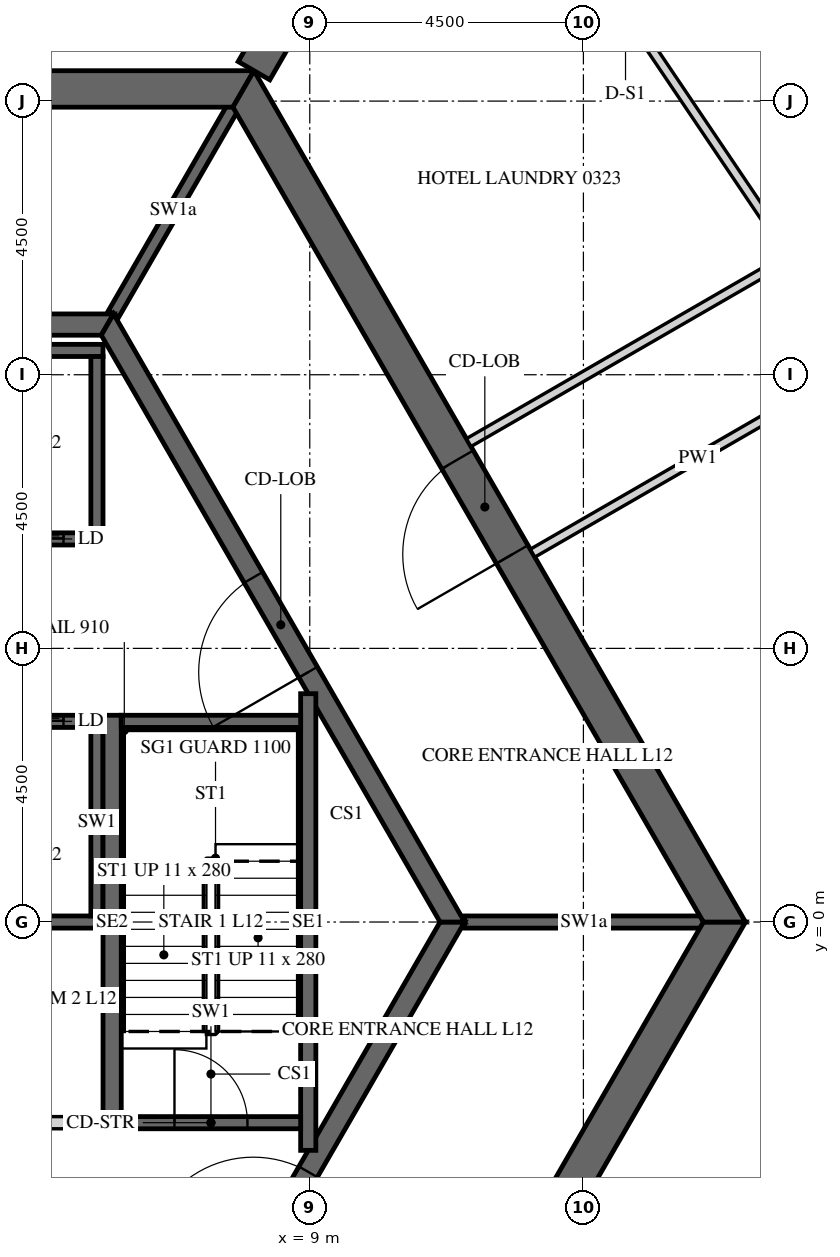
"""IFC4 building model, lengths in metres.
Left out: names, types, materials, properties, quantities, classifications, styles, units other than length and angle.
Written with IfcOpenShell. Run it as: python <this file> out.ifc"""

import sys

from ifc_helpers import new_model, si_unit, direction, frame, frame_2d, origin, place, context, subcontext, project, spatial, polyline, rectangle, outline, extrude, element, fill, save


model = new_model("IFC4")
c1 = context("Model", 3, precision=1e-05, world=origin(), true_north=direction((0.0, 1.0)))
c2 = subcontext(c1, "Body", "Model", "MODEL_VIEW")
j1 = project(units=[si_unit("LENGTHUNIT", "METRE"), si_unit("PLANEANGLEUNIT", "RADIAN")], contexts=[c1])
p1 = place(None, origin())
s1 = spatial("IfcSite", under=j1, at=p1, CompositionType="ELEMENT")
p2 = place(p1, origin())
s2 = spatial("IfcBuilding", under=s1, at=p2, CompositionType="ELEMENT")
p3 = place(p2, frame((0.0, 0.0, 60.9)))
s3 = spatial("IfcBuildingStorey", under=s2, at=p3, CompositionType="ELEMENT", Elevation=60.9)
p4 = place(p3, frame((7.91, -13.7, -0.15), z_axis=(0.0, 0.0, 1.0), x_axis=(0.499999880136, 0.866025472988, 0.0)))
e1 = element("IfcWall", 1, at=p4, inside=s3, PredefinedType="SHEAR", context=c2, shape_type="SweptSolid", body=[
    extrude(outline(polyline([(-0.173, -0.3), (15.993, -0.3), (15.646, 0.3), (0.173, 0.3), (-0.173, -0.3)])), origin(), (0.0, 0.0, 1.0), 3.9),
])
p5 = place(p4, frame((7.039, 0.0, 0.15)))
e2 = element("IfcOpeningElement", 2, at=p5, cuts=e1, PredefinedType="OPENING", context=c2, shape_type="SweptSolid", body=[
    extrude(rectangle(XDim=1.8, YDim=2.4, at=frame_2d((0.9, 1.2))), frame((0.0, 0.31, 0.0), z_axis=(0.0, -1.0, 0.0), x_axis=(1.0, 0.0, 0.0)), (0.0, 0.0, 1.0), 0.62),
])
p6 = place(p3, frame((15.819, 0.0, -0.15), z_axis=(0.0, 0.0, 1.0), x_axis=(-0.499999880136, 0.866025472988, 0.0)))
e3 = element("IfcWall", 3, at=p6, inside=s3, PredefinedType="SHEAR", context=c2, shape_type="SweptSolid", body=[
    extrude(outline(polyline([(-0.173, -0.3), (15.993, -0.3), (15.646, 0.3), (0.173, 0.3), (-0.173, -0.3)])), origin(), (0.0, 0.0, 1.0), 3.9),
])
p7 = place(p6, frame((6.981, 0.0, 0.15)))
e4 = element("IfcOpeningElement", 4, at=p7, cuts=e3, PredefinedType="OPENING", context=c2, shape_type="SweptSolid", body=[
    extrude(rectangle(XDim=1.8, YDim=2.4, at=frame_2d((0.9, 1.2))), frame((0.0, 0.31, 0.0), z_axis=(0.0, -1.0, 0.0), x_axis=(1.0, 0.0, 0.0)), (0.0, 0.0, 1.0), 0.62),
])
p8 = place(p3, frame((7.91, 13.7, -0.15), z_axis=(0.0, 0.0, 1.0), x_axis=(-1.0, 0.0, 0.0)))
e5 = element("IfcWall", 5, at=p8, inside=s3, PredefinedType="SHEAR", context=c2, shape_type="SweptSolid", body=[
    extrude(outline(polyline([(-0.173, -0.3), (15.993, -0.3), (15.646, 0.3), (0.173, 0.3), (-0.173, -0.3)])), origin(), (0.0, 0.0, 1.0), 3.9),
])
p9 = place(p8, frame((7.31, 0.0, 0.15)))
e6 = element("IfcOpeningElement", 6, at=p9, cuts=e5, PredefinedType="OPENING", context=c2, shape_type="SweptSolid", body=[
    extrude(rectangle(XDim=1.2, YDim=2.4, at=frame_2d((0.6, 1.2))), frame((0.0, 0.31, 0.0), z_axis=(0.0, -1.0, 0.0), x_axis=(1.0, 0.0, 0.0)), (0.0, 0.0, 1.0), 0.62),
])
p10 = place(p3, frame((8.083, 14.0, -0.15), z_axis=(0.0, 0.0, 1.0), x_axis=(0.499997680643, 0.866026742862, 0.0)))
e7 = element("IfcWall", 7, at=p10, inside=s3, PredefinedType="SHEAR", context=c2, shape_type="SweptSolid", body=[
    extrude(rectangle(XDim=16.509, YDim=0.6, at=frame_2d((8.254, 0.0))), origin(), (0.0, 0.0, 1.0), 3.9),
])
p11 = place(p10, frame((7.354, 0.0, 0.15)))
e8 = element("IfcOpeningElement", 8, at=p11, cuts=e7, PredefinedType="OPENING", context=c2, shape_type="SweptSolid", body=[
    extrude(rectangle(XDim=1.8, YDim=2.4, at=frame_2d((0.9, 1.2))), frame((0.0, 0.31, 0.0), z_axis=(0.0, -1.0, 0.0), x_axis=(1.0, 0.0, 0.0)), (0.0, 0.0, 1.0), 0.62),
])
p12 = place(p3, frame((5.673, -9.825, -0.15), z_axis=(0.0, 0.0, 1.0), x_axis=(0.499995046907, 0.866028263435, 0.0)))
e9 = element("IfcWall", 9, at=p12, inside=s3, PredefinedType="SHEAR", context=c2, shape_type="SweptSolid", body=[
    extrude(outline(polyline([(-0.101, -0.175), (11.446, -0.175), (11.244, 0.175), (0.101, 0.175), (-0.101, -0.175)])), origin(), (0.0, 0.0, 1.0), 3.9),
])
p13 = place(p12, frame((4.801, 0.0, 0.15)))
e10 = element("IfcOpeningElement", 10, at=p13, cuts=e9, PredefinedType="OPENING", context=c2, shape_type="SweptSolid", body=[
    extrude(rectangle(XDim=1.8, YDim=2.4, at=frame_2d((0.9, 1.2))), frame((0.0, 0.185, 0.0), z_axis=(0.0, -1.0, 0.0), x_axis=(1.0, 0.0, 0.0)), (0.0, 0.0, 1.0), 0.37),
])
p14 = place(p3, frame((11.345, 0.0, -0.15), z_axis=(0.0, 0.0, 1.0), x_axis=(-0.499995046907, 0.866028263435, 0.0)))
e11 = element("IfcWall", 11, at=p14, inside=s3, PredefinedType="SHEAR", context=c2, shape_type="SweptSolid", body=[
    extrude(outline(polyline([(-0.101, -0.175), (11.446, -0.175), (11.244, 0.175), (0.101, 0.175), (-0.101, -0.175)])), origin(), (0.0, 0.0, 1.0), 3.9),
])
p15 = place(p14, frame((4.744, 0.0, 0.15)))
e12 = element("IfcOpeningElement", 12, at=p15, cuts=e11, PredefinedType="OPENING", context=c2, shape_type="SweptSolid", body=[
    extrude(rectangle(XDim=1.8, YDim=2.4, at=frame_2d((0.9, 1.2))), frame((0.0, 0.185, 0.0), z_axis=(0.0, -1.0, 0.0), x_axis=(1.0, 0.0, 0.0)), (0.0, 0.0, 1.0), 0.37),
])
p16 = place(p3, frame((5.673, 9.825, -0.15), z_axis=(0.0, 0.0, 1.0), x_axis=(-1.0, 0.0, 0.0)))
e13 = element("IfcWall", 13, at=p16, inside=s3, PredefinedType="SHEAR", context=c2, shape_type="SweptSolid", body=[
    extrude(outline(polyline([(-0.101, -0.175), (11.446, -0.175), (11.244, 0.175), (0.101, 0.175), (-0.101, -0.175)])), origin(), (0.0, 0.0, 1.0), 3.9),
])
p17 = place(p3, frame((-5.6, 6.3, -0.25), z_axis=(0.0, 0.0, 1.0), x_axis=(1.0, 0.0, 0.0)))
e14 = element("IfcWall", 14, at=p17, inside=s3, PredefinedType="SHEAR", context=c2, shape_type="SweptSolid", body=[
    extrude(rectangle(XDim=11.2, YDim=0.2, at=frame_2d((5.6, 0.0))), origin(), (0.0, 0.0, 1.0), 3.9),
])
p18 = place(p17, frame((0.65, 0.0, 0.25)))
e15 = element("IfcOpeningElement", 15, at=p18, cuts=e14, PredefinedType="OPENING", context=c2, shape_type="SweptSolid", body=[
    extrude(rectangle(XDim=1.1, YDim=2.1, at=frame_2d((0.55, 1.05))), frame((0.0, 0.11, 0.0), z_axis=(0.0, -1.0, 0.0), x_axis=(1.0, 0.0, 0.0)), (0.0, 0.0, 1.0), 0.22),
])
p19 = place(p17, frame((2.85, 0.0, 0.25)))
e16 = element("IfcOpeningElement", 16, at=p19, cuts=e14, PredefinedType="OPENING", context=c2, shape_type="SweptSolid", body=[
    extrude(rectangle(XDim=1.1, YDim=2.1, at=frame_2d((0.55, 1.05))), frame((0.0, 0.11, 0.0), z_axis=(0.0, -1.0, 0.0), x_axis=(1.0, 0.0, 0.0)), (0.0, 0.0, 1.0), 0.22),
])
p20 = place(p17, frame((5.05, 0.0, 0.25)))
e17 = element("IfcOpeningElement", 17, at=p20, cuts=e14, PredefinedType="OPENING", context=c2, shape_type="SweptSolid", body=[
    extrude(rectangle(XDim=1.1, YDim=2.1, at=frame_2d((0.55, 1.05))), frame((0.0, 0.11, 0.0), z_axis=(0.0, -1.0, 0.0), x_axis=(1.0, 0.0, 0.0)), (0.0, 0.0, 1.0), 0.22),
])
p21 = place(p17, frame((7.25, 0.0, 0.25)))
e18 = element("IfcOpeningElement", 18, at=p21, cuts=e14, PredefinedType="OPENING", context=c2, shape_type="SweptSolid", body=[
    extrude(rectangle(XDim=1.1, YDim=2.1, at=frame_2d((0.55, 1.05))), frame((0.0, 0.11, 0.0), z_axis=(0.0, -1.0, 0.0), x_axis=(1.0, 0.0, 0.0)), (0.0, 0.0, 1.0), 0.22),
])
p22 = place(p17, frame((9.45, 0.0, 0.25)))
e19 = element("IfcOpeningElement", 19, at=p22, cuts=e14, PredefinedType="OPENING", context=c2, shape_type="SweptSolid", body=[
    extrude(rectangle(XDim=1.1, YDim=2.1, at=frame_2d((0.55, 1.05))), frame((0.0, 0.11, 0.0), z_axis=(0.0, -1.0, 0.0), x_axis=(1.0, 0.0, 0.0)), (0.0, 0.0, 1.0), 0.22),
])
p23 = place(p3, frame((-5.6, 9.4, -0.25), z_axis=(0.0, 0.0, 1.0), x_axis=(1.0, 0.0, 0.0)))
e20 = element("IfcWall", 20, at=p23, inside=s3, PredefinedType="SHEAR", context=c2, shape_type="SweptSolid", body=[
    extrude(rectangle(XDim=11.2, YDim=0.2, at=frame_2d((5.6, 0.0))), origin(), (0.0, 0.0, 1.0), 3.9),
])
p24 = place(p3, frame((5.5, 6.4, -0.25), z_axis=(0.0, 0.0, 1.0), x_axis=(0.0, 1.0, 0.0)))
e21 = element("IfcWall", 21, at=p24, inside=s3, PredefinedType="SHEAR", context=c2, shape_type="SweptSolid", body=[
    extrude(rectangle(XDim=2.9, YDim=0.2, at=frame_2d((1.45, 0.0))), origin(), (0.0, 0.0, 1.0), 3.9),
])
p25 = place(p3, frame((-5.6, 3.3, -0.25), z_axis=(0.0, 0.0, 1.0), x_axis=(1.0, 0.0, 0.0)))
e22 = element("IfcWall", 22, at=p25, inside=s3, PredefinedType="SHEAR", context=c2, shape_type="SweptSolid", body=[
    extrude(rectangle(XDim=11.2, YDim=0.2, at=frame_2d((5.6, 0.0))), origin(), (0.0, 0.0, 1.0), 3.9),
])
p26 = place(p25, frame((0.65, 0.0, 0.25)))
e23 = element("IfcOpeningElement", 23, at=p26, cuts=e22, PredefinedType="OPENING", context=c2, shape_type="SweptSolid", body=[
    extrude(rectangle(XDim=1.1, YDim=2.1, at=frame_2d((0.55, 1.05))), frame((0.0, 0.11, 0.0), z_axis=(0.0, -1.0, 0.0), x_axis=(1.0, 0.0, 0.0)), (0.0, 0.0, 1.0), 0.22),
])
p27 = place(p25, frame((2.85, 0.0, 0.25)))
e24 = element("IfcOpeningElement", 24, at=p27, cuts=e22, PredefinedType="OPENING", context=c2, shape_type="SweptSolid", body=[
    extrude(rectangle(XDim=1.1, YDim=2.1, at=frame_2d((0.55, 1.05))), frame((0.0, 0.11, 0.0), z_axis=(0.0, -1.0, 0.0), x_axis=(1.0, 0.0, 0.0)), (0.0, 0.0, 1.0), 0.22),
])
p28 = place(p25, frame((5.05, 0.0, 0.25)))
e25 = element("IfcOpeningElement", 25, at=p28, cuts=e22, PredefinedType="OPENING", context=c2, shape_type="SweptSolid", body=[
    extrude(rectangle(XDim=1.1, YDim=2.1, at=frame_2d((0.55, 1.05))), frame((0.0, 0.11, 0.0), z_axis=(0.0, -1.0, 0.0), x_axis=(1.0, 0.0, 0.0)), (0.0, 0.0, 1.0), 0.22),
])
p29 = place(p25, frame((7.25, 0.0, 0.25)))
e26 = element("IfcOpeningElement", 26, at=p29, cuts=e22, PredefinedType="OPENING", context=c2, shape_type="SweptSolid", body=[
    extrude(rectangle(XDim=1.1, YDim=2.1, at=frame_2d((0.55, 1.05))), frame((0.0, 0.11, 0.0), z_axis=(0.0, -1.0, 0.0), x_axis=(1.0, 0.0, 0.0)), (0.0, 0.0, 1.0), 0.22),
])
p30 = place(p25, frame((9.45, 0.0, 0.25)))
e27 = element("IfcOpeningElement", 27, at=p30, cuts=e22, PredefinedType="OPENING", context=c2, shape_type="SweptSolid", body=[
    extrude(rectangle(XDim=1.1, YDim=2.1, at=frame_2d((0.55, 1.05))), frame((0.0, 0.11, 0.0), z_axis=(0.0, -1.0, 0.0), x_axis=(1.0, 0.0, 0.0)), (0.0, 0.0, 1.0), 0.22),
])
p31 = place(p3, frame((-5.6, 0.0, -0.25), z_axis=(0.0, 0.0, 1.0), x_axis=(1.0, 0.0, 0.0)))
e28 = element("IfcWall", 28, at=p31, inside=s3, PredefinedType="SHEAR", context=c2, shape_type="SweptSolid", body=[
    extrude(rectangle(XDim=11.2, YDim=0.2, at=frame_2d((5.6, 0.0))), origin(), (0.0, 0.0, 1.0), 3.9),
])
p32 = place(p3, frame((5.5, 0.1, -0.25), z_axis=(0.0, 0.0, 1.0), x_axis=(0.0, 1.0, 0.0)))
e29 = element("IfcWall", 29, at=p32, inside=s3, PredefinedType="SHEAR", context=c2, shape_type="SweptSolid", body=[
    extrude(rectangle(XDim=3.1, YDim=0.2, at=frame_2d((1.55, 0.0))), origin(), (0.0, 0.0, 1.0), 3.9),
])
p33 = place(p3, frame((0.1, -3.3, 0.0), z_axis=(0.0, 0.0, 1.0), x_axis=(1.0, 0.0, 0.0)))
e30 = element("IfcWall", 30, at=p33, inside=s3, PredefinedType="PARTITIONING", context=c2, shape_type="SweptSolid", body=[
    extrude(rectangle(XDim=5.5, YDim=0.2, at=frame_2d((2.75, 0.0))), origin(), (0.0, 0.0, 1.0), 3.65),
])
p34 = place(p33, frame((2.3, 0.0, 0.0)))
e31 = element("IfcOpeningElement", 31, at=p34, cuts=e30, PredefinedType="OPENING", context=c2, shape_type="SweptSolid", body=[
    extrude(rectangle(XDim=0.9, YDim=2.1, at=frame_2d((0.45, 1.05))), frame((0.0, 0.11, 0.0), z_axis=(0.0, -1.0, 0.0), x_axis=(1.0, 0.0, 0.0)), (0.0, 0.0, 1.0), 0.22),
])
p35 = place(p3, frame((11.547, 0.0, -0.15), z_axis=(0.0, 0.0, 1.0), x_axis=(1.0, 0.0, 0.0)))
e32 = element("IfcWall", 32, at=p35, inside=s3, PredefinedType="SHEAR", context=c2, shape_type="SweptSolid", body=[
    extrude(rectangle(XDim=3.926, YDim=0.2, at=frame_2d((1.963, 0.0))), origin(), (0.0, 0.0, 1.0), 3.9),
])
p36 = place(p3, frame((5.773, 10.0, -0.15), z_axis=(0.0, 0.0, 1.0), x_axis=(0.500038251005, 0.86600331843, 0.0)))
e33 = element("IfcWall", 33, at=p36, inside=s3, PredefinedType="SHEAR", context=c2, shape_type="SweptSolid", body=[
    extrude(rectangle(XDim=3.926, YDim=0.2, at=frame_2d((1.963, 0.0))), origin(), (0.0, 0.0, 1.0), 3.9),
])
p37 = place(p3, frame((5.75, -3.4, -0.25), z_axis=(0.0, 0.0, 1.0), x_axis=(0.0, 1.0, 0.0)))
e34 = element("IfcWall", 34, at=p37, inside=s3, PredefinedType="SHEAR", context=c2, shape_type="SweptSolid", body=[
    extrude(rectangle(XDim=6.8, YDim=0.3, at=frame_2d((3.4, 0.0))), origin(), (0.0, 0.0, 1.0), 3.9),
])
p38 = place(p3, frame((8.975, -3.755, -0.25), z_axis=(0.0, 0.0, 1.0), x_axis=(0.0, 1.0, 0.0)))
e35 = element("IfcWall", 35, at=p38, inside=s3, PredefinedType="SHEAR", context=c2, shape_type="SweptSolid", body=[
    extrude(rectangle(XDim=7.51, YDim=0.25, at=frame_2d((3.755, 0.0))), origin(), (0.0, 0.0, 1.0), 3.9),
])
p39 = place(p3, frame((5.9, 3.3, -0.25), z_axis=(0.0, 0.0, 1.0), x_axis=(1.0, 0.0, 0.0)))
e36 = element("IfcWall", 36, at=p39, inside=s3, PredefinedType="SHEAR", context=c2, shape_type="SweptSolid", body=[
    extrude(rectangle(XDim=2.95, YDim=0.2, at=frame_2d((1.475, 0.0))), origin(), (0.0, 0.0, 1.0), 3.9),
])
p40 = place(p3, frame((5.9, -3.3, -0.25), z_axis=(0.0, 0.0, 1.0), x_axis=(1.0, 0.0, 0.0)))
e37 = element("IfcWall", 37, at=p40, inside=s3, PredefinedType="SHEAR", context=c2, shape_type="SweptSolid", body=[
    extrude(rectangle(XDim=2.95, YDim=0.2, at=frame_2d((1.475, 0.0))), origin(), (0.0, 0.0, 1.0), 3.9),
])
p41 = place(p40, frame((0.875, 0.0, 0.25)))
e38 = element("IfcOpeningElement", 38, at=p41, cuts=e37, PredefinedType="OPENING", context=c2, shape_type="SweptSolid", body=[
    extrude(rectangle(XDim=1.2, YDim=2.4, at=frame_2d((0.6, 1.2))), frame((0.0, 0.11, 0.0), z_axis=(0.0, -1.0, 0.0), x_axis=(1.0, 0.0, 0.0)), (0.0, 0.0, 1.0), 0.22),
])
p42 = place(p3, frame((13.928, -19.775, 0.0), z_axis=(0.0, 0.0, 1.0), x_axis=(0.50000450071, 0.866022805283, 0.0)))
e39 = element("IfcWall", 39, at=p42, inside=s3, PredefinedType="PARTITIONING", context=c2, shape_type="SweptSolid", body=[
    extrude(rectangle(XDim=23.877, YDim=0.15, at=frame_2d((11.938, 0.0))), origin(), (0.0, 0.0, 1.0), 2.988),
])
p43 = place(p42, frame((6.443, 0.0, 0.0)))
e40 = element("IfcOpeningElement", 40, at=p43, cuts=e39, PredefinedType="OPENING", context=c2, shape_type="SweptSolid", body=[
    extrude(rectangle(XDim=1.0, YDim=2.1, at=frame_2d((0.5, 1.05))), frame((0.0, 0.085, 0.0), z_axis=(0.0, -1.0, 0.0), x_axis=(1.0, 0.0, 0.0)), (0.0, 0.0, 1.0), 0.17),
])
p44 = place(p42, frame((14.972, 0.0, 0.0)))
e41 = element("IfcOpeningElement", 41, at=p44, cuts=e39, PredefinedType="OPENING", context=c2, shape_type="SweptSolid", body=[
    extrude(rectangle(XDim=1.0, YDim=2.1, at=frame_2d((0.5, 1.05))), frame((0.0, 0.085, 0.0), z_axis=(0.0, -1.0, 0.0), x_axis=(1.0, 0.0, 0.0)), (0.0, 0.0, 1.0), 0.17),
])
p45 = place(p3, frame((25.821, 0.972, 0.0), z_axis=(0.0, 0.0, 1.0), x_axis=(-0.559201442833, 0.829031812619, 0.0)))
e42 = element("IfcWall", 42, at=p45, inside=s3, PredefinedType="PARTITIONING", context=c2, shape_type="SweptSolid", body=[
    extrude(rectangle(XDim=22.002, YDim=0.15, at=frame_2d((11.001, 0.0))), origin(), (0.0, 0.0, 1.0), 2.988),
])
p46 = place(p45, frame((0.769, 0.0, 0.0)))
e43 = element("IfcOpeningElement", 43, at=p46, cuts=e42, PredefinedType="OPENING", context=c2, shape_type="SweptSolid", body=[
    extrude(rectangle(XDim=1.0, YDim=2.1, at=frame_2d((0.5, 1.05))), frame((0.0, 0.085, 0.0), z_axis=(0.0, -1.0, 0.0), x_axis=(1.0, 0.0, 0.0)), (0.0, 0.0, 1.0), 0.17),
])
p47 = place(p45, frame((11.421, 0.0, 0.0)))
e44 = element("IfcOpeningElement", 44, at=p47, cuts=e42, PredefinedType="OPENING", context=c2, shape_type="SweptSolid", body=[
    extrude(rectangle(XDim=1.0, YDim=2.1, at=frame_2d((0.5, 1.05))), frame((0.0, 0.085, 0.0), z_axis=(0.0, -1.0, 0.0), x_axis=(1.0, 0.0, 0.0)), (0.0, 0.0, 1.0), 0.17),
])
p48 = place(p45, frame((19.711, 0.0, 0.0)))
e45 = element("IfcOpeningElement", 45, at=p48, cuts=e42, PredefinedType="OPENING", context=c2, shape_type="SweptSolid", body=[
    extrude(rectangle(XDim=1.0, YDim=2.1, at=frame_2d((0.5, 1.05))), frame((0.0, 0.085, 0.0), z_axis=(0.0, -1.0, 0.0), x_axis=(1.0, 0.0, 0.0)), (0.0, 0.0, 1.0), 0.17),
])
p49 = place(p3, frame((12.664, 6.066, 0.0), z_axis=(0.0, 0.0, 1.0), x_axis=(0.866036561919, 0.499980673046, 0.0)))
e46 = element("IfcWall", 46, at=p49, inside=s3, PredefinedType="PARTITIONING", context=c2, shape_type="SweptSolid", body=[
    extrude(rectangle(XDim=6.275, YDim=0.15, at=frame_2d((3.137, 0.0))), origin(), (0.0, 0.0, 1.0), 2.988),
])
p50 = place(p3, frame((11.465, 19.037, 0.0), z_axis=(0.0, 0.0, 1.0), x_axis=(0.559196064773, -0.829035440221, 0.0)))
e47 = element("IfcWall", 47, at=p50, inside=s3, PredefinedType="PARTITIONING", context=c2, shape_type="SweptSolid", body=[
    extrude(rectangle(XDim=9.757, YDim=0.15, at=frame_2d((4.878, 0.0))), origin(), (0.0, 0.0, 1.0), 2.988),
])
p51 = place(p50, frame((4.428, 0.0, 0.0)))
e48 = element("IfcOpeningElement", 48, at=p51, cuts=e47, PredefinedType="OPENING", context=c2, shape_type="SweptSolid", body=[
    extrude(rectangle(XDim=0.9, YDim=2.1, at=frame_2d((0.45, 1.05))), frame((0.0, 0.085, 0.0), z_axis=(0.0, -1.0, 0.0), x_axis=(1.0, 0.0, 0.0)), (0.0, 0.0, 1.0), 0.17),
])
p52 = place(p3, frame((16.855, 10.911, 0.0), z_axis=(0.0, 0.0, 1.0), x_axis=(-0.866020343444, -0.500008764664, 0.0)))
e49 = element("IfcWall", 49, at=p52, inside=s3, PredefinedType="PARTITIONING", context=c2, shape_type="SweptSolid", body=[
    extrude(rectangle(XDim=6.053, YDim=0.15, at=frame_2d((3.026, 0.0))), origin(), (0.0, 0.0, 1.0), 2.988),
])
p53 = place(p7, origin())
e50 = element("IfcDoor", 50, at=p53, inside=s3, OperationType="DOUBLE_DOOR_SINGLE_SWING", PredefinedType="DOOR", context=c2, shape_type="SweptSolid", body=[
    extrude(rectangle(XDim=1.8, YDim=2.4, at=frame_2d((0.9, 1.2))), frame((0.0, 0.025, 0.0), z_axis=(0.0, -1.0, 0.0), x_axis=(1.0, 0.0, 0.0)), (0.0, 0.0, 1.0), 0.05),
])
fill(e4, e50)
p54 = place(p15, origin())
e51 = element("IfcDoor", 51, at=p54, inside=s3, OperationType="DOUBLE_DOOR_SINGLE_SWING", PredefinedType="DOOR", context=c2, shape_type="SweptSolid", body=[
    extrude(rectangle(XDim=1.8, YDim=2.4, at=frame_2d((0.9, 1.2))), frame((0.0, 0.025, 0.0), z_axis=(0.0, -1.0, 0.0), x_axis=(1.0, 0.0, 0.0)), (0.0, 0.0, 1.0), 0.05),
])
fill(e12, e51)
p55 = place(p13, origin())
e52 = element("IfcDoor", 52, at=p55, inside=s3, OperationType="DOUBLE_DOOR_SINGLE_SWING", PredefinedType="DOOR", context=c2, shape_type="SweptSolid", body=[
    extrude(rectangle(XDim=1.8, YDim=2.4, at=frame_2d((0.9, 1.2))), frame((0.0, 0.025, 0.0), z_axis=(0.0, -1.0, 0.0), x_axis=(1.0, 0.0, 0.0)), (0.0, 0.0, 1.0), 0.05),
])
fill(e10, e52)
p56 = place(p41, origin())
e53 = element("IfcDoor", 53, at=p56, inside=s3, OperationType="SINGLE_SWING_LEFT", PredefinedType="DOOR", context=c2, shape_type="SweptSolid", body=[
    extrude(rectangle(XDim=1.2, YDim=2.4, at=frame_2d((0.6, 1.2))), frame((0.0, 0.025, 0.0), z_axis=(0.0, -1.0, 0.0), x_axis=(1.0, 0.0, 0.0)), (0.0, 0.0, 1.0), 0.05),
])
fill(e38, e53)
p57 = place(p22, origin())
e54 = element("IfcDoor", 54, at=p57, inside=s3, OperationType="SLIDING_TO_LEFT", PredefinedType="DOOR", context=c2, shape_type="SweptSolid", body=[
    extrude(rectangle(XDim=1.1, YDim=2.1, at=frame_2d((0.55, 1.05))), frame((0.0, 0.025, 0.0), z_axis=(0.0, -1.0, 0.0), x_axis=(1.0, 0.0, 0.0)), (0.0, 0.0, 1.0), 0.05),
])
fill(e19, e54)
p58 = place(p30, origin())
e55 = element("IfcDoor", 55, at=p58, inside=s3, OperationType="SLIDING_TO_LEFT", PredefinedType="DOOR", context=c2, shape_type="SweptSolid", body=[
    extrude(rectangle(XDim=1.1, YDim=2.1, at=frame_2d((0.55, 1.05))), frame((0.0, 0.025, 0.0), z_axis=(0.0, -1.0, 0.0), x_axis=(1.0, 0.0, 0.0)), (0.0, 0.0, 1.0), 0.05),
])
fill(e27, e55)
save(model, sys.argv[1])
